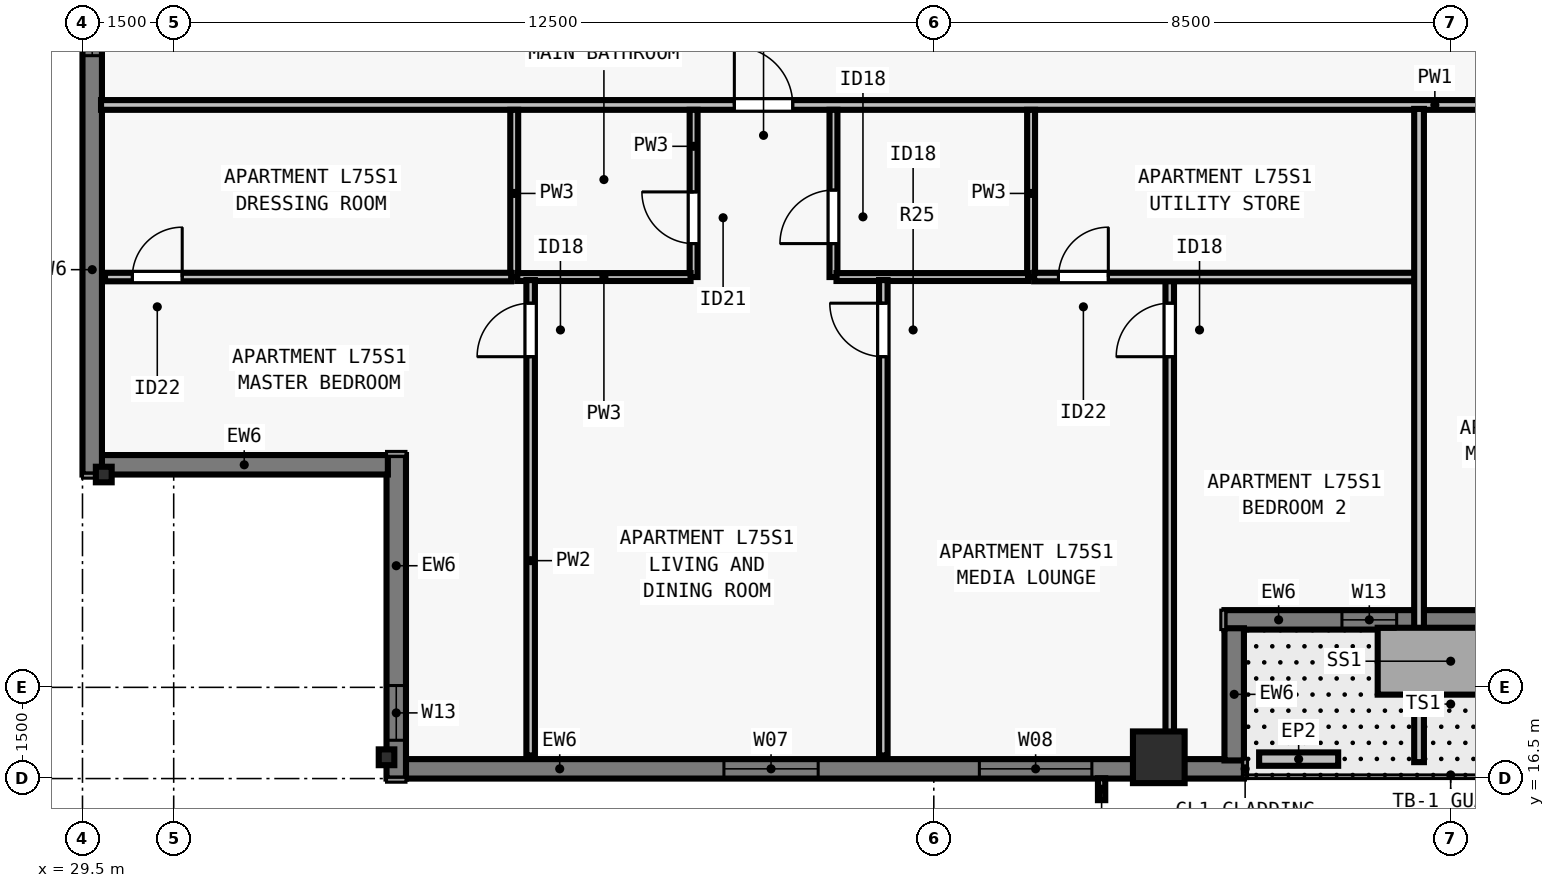
"""IFC4 building model, lengths in metres.
Left out: names, types, materials, properties, quantities, classifications, styles, units other than length and angle.
Written with IfcOpenShell. Run it as: python <this file> out.ifc"""

import sys

from ifc_helpers import new_model, si_unit, direction, frame, frame_2d, origin, origin_2d, place, context, subcontext, project, spatial, rectangle, i_section, extrude, element, fill, save


model = new_model("IFC4")
c1 = context("Model", 3, precision=1e-05, world=origin(), true_north=direction((0.0, 1.0)))
c2 = subcontext(c1, "Body", "Model", "MODEL_VIEW")
j1 = project(units=[si_unit("LENGTHUNIT", "METRE"), si_unit("PLANEANGLEUNIT", "RADIAN")], contexts=[c1])
p1 = place(None, origin())
s1 = spatial("IfcSite", under=j1, at=p1, CompositionType="ELEMENT")
p2 = place(p1, origin())
s2 = spatial("IfcBuilding", under=s1, at=p2, CompositionType="ELEMENT")
p3 = place(p2, frame((0.0, 0.0, 272.5)))
s3 = spatial("IfcBuildingStorey", under=s2, at=p3, CompositionType="ELEMENT", Elevation=272.5)
p4 = place(p3, frame((34.5, 16.85, 0.0), z_axis=(0.0, 0.0, 1.0), x_axis=(1.0, 0.0, 0.0)))
e1 = element("IfcColumn", 1, at=p4, inside=s3, PredefinedType="COLUMN", context=c2, shape_type="SweptSolid", body=[
    extrude(i_section(OverallWidth=0.256, OverallDepth=0.26, WebThickness=0.01, FlangeThickness=0.017, FilletRadius=0.013, at=origin_2d()), origin(), (0.0, 0.0, 1.0), 3.5),
])
p5 = place(p3, frame((47.2, 16.85, 0.0), z_axis=(0.0, 0.0, 1.0), x_axis=(1.0, 0.0, 0.0)))
e2 = element("IfcColumn", 2, at=p5, inside=s3, PredefinedType="COLUMN", context=c2, shape_type="SweptSolid", body=[
    extrude(rectangle(XDim=0.85, YDim=0.85, at=origin_2d()), origin(), (0.0, 0.0, 1.0), 3.5),
])
p6 = place(p3, frame((29.85, 21.5, 0.0), z_axis=(0.0, 0.0, 1.0), x_axis=(0.0, 1.0, 0.0)))
e3 = element("IfcColumn", 3, at=p6, inside=s3, PredefinedType="COLUMN", context=c2, shape_type="SweptSolid", body=[
    extrude(i_section(OverallWidth=0.256, OverallDepth=0.26, WebThickness=0.01, FlangeThickness=0.017, FilletRadius=0.013, at=origin_2d()), origin(), (0.0, 0.0, 1.0), 3.5),
])
p7 = place(p3, frame((48.6, 16.66, 0.0), z_axis=(0.0, 0.0, 1.0), x_axis=(-1.0, 0.0, 0.0)))
e4 = element("IfcWall", 4, at=p7, inside=s3, PredefinedType="SOLIDWALL", context=c2, shape_type="SweptSolid", body=[
    extrude(rectangle(XDim=13.802, YDim=0.32, at=frame_2d((6.901, 0.0))), origin(), (0.0, 0.0, 1.0), 3.24),
])
p8 = place(p7, frame((2.5, 0.0, 0.8)))
e5 = element("IfcOpeningElement", 5, at=p8, cuts=e4, PredefinedType="OPENING", context=c2, shape_type="SweptSolid", body=[
    extrude(rectangle(XDim=1.85, YDim=1.628, at=frame_2d((0.925, 0.814))), frame((0.0, 0.17, 0.0), z_axis=(0.0, -1.0, 0.0), x_axis=(1.0, 0.0, 0.0)), (0.0, 0.0, 1.0), 0.34),
])
p9 = place(p7, frame((7.001, 0.0, 0.8)))
e6 = element("IfcOpeningElement", 6, at=p9, cuts=e4, PredefinedType="OPENING", context=c2, shape_type="SweptSolid", body=[
    extrude(rectangle(XDim=1.55, YDim=1.628, at=frame_2d((0.775, 0.814))), frame((0.0, 0.17, 0.0), z_axis=(0.0, -1.0, 0.0), x_axis=(1.0, 0.0, 0.0)), (0.0, 0.0, 1.0), 0.34),
])
p10 = place(p3, frame((34.66, 16.5, 0.0), z_axis=(0.0, 0.0, 1.0), x_axis=(0.0, 1.0, 0.0)))
e7 = element("IfcWall", 7, at=p10, inside=s3, PredefinedType="SOLIDWALL", context=c2, shape_type="SweptSolid", body=[
    extrude(rectangle(XDim=5.32, YDim=0.32, at=frame_2d((2.66, 0.0))), origin(), (0.0, 0.0, 1.0), 3.24),
])
p11 = place(p10, frame((0.63, 0.0, 0.8)))
e8 = element("IfcOpeningElement", 8, at=p11, cuts=e7, PredefinedType="OPENING", context=c2, shape_type="SweptSolid", body=[
    extrude(rectangle(XDim=0.9, YDim=1.628, at=frame_2d((0.45, 0.814))), frame((0.0, 0.17, 0.0), z_axis=(0.0, -1.0, 0.0), x_axis=(1.0, 0.0, 0.0)), (0.0, 0.0, 1.0), 0.34),
])
p12 = place(p3, frame((34.522, 21.66, 0.0), z_axis=(0.0, 0.0, 1.0), x_axis=(-1.0, 0.0, 0.0)))
e9 = element("IfcWall", 9, at=p12, inside=s3, PredefinedType="SOLIDWALL", context=c2, shape_type="SweptSolid", body=[
    extrude(rectangle(XDim=4.724, YDim=0.32, at=frame_2d((2.362, 0.0))), origin(), (0.0, 0.0, 1.0), 3.24),
])
p13 = place(p3, frame((29.66, 21.5, 0.0), z_axis=(0.0, 0.0, 1.0), x_axis=(0.0, 1.0, 0.0)))
e10 = element("IfcWall", 10, at=p13, inside=s3, PredefinedType="SOLIDWALL", context=c2, shape_type="SweptSolid", body=[
    extrude(rectangle(XDim=34.702, YDim=0.32, at=frame_2d((17.351, 0.0))), origin(), (0.0, 0.0, 1.0), 3.24),
])
p14 = place(p13, frame((6.888, 0.0, 0.8)))
e11 = element("IfcOpeningElement", 11, at=p14, cuts=e10, PredefinedType="OPENING", context=c2, shape_type="SweptSolid", body=[
    extrude(rectangle(XDim=1.55, YDim=1.628, at=frame_2d((0.775, 0.814))), frame((0.0, 0.17, 0.0), z_axis=(0.0, -1.0, 0.0), x_axis=(1.0, 0.0, 0.0)), (0.0, 0.0, 1.0), 0.34),
])
p15 = place(p13, frame((10.113, 0.0, 0.8)))
e12 = element("IfcOpeningElement", 12, at=p15, cuts=e10, PredefinedType="OPENING", context=c2, shape_type="SweptSolid", body=[
    extrude(rectangle(XDim=1.85, YDim=1.628, at=frame_2d((0.925, 0.814))), frame((0.0, 0.17, 0.0), z_axis=(0.0, -1.0, 0.0), x_axis=(1.0, 0.0, 0.0)), (0.0, 0.0, 1.0), 0.34),
])
p16 = place(p13, frame((14.888, 0.0, 0.8)))
e13 = element("IfcOpeningElement", 13, at=p16, cuts=e10, PredefinedType="OPENING", context=c2, shape_type="SweptSolid", body=[
    extrude(rectangle(XDim=1.55, YDim=1.628, at=frame_2d((0.775, 0.814))), frame((0.0, 0.17, 0.0), z_axis=(0.0, -1.0, 0.0), x_axis=(1.0, 0.0, 0.0)), (0.0, 0.0, 1.0), 0.34),
])
p17 = place(p13, frame((18.114, 0.0, 0.8)))
e14 = element("IfcOpeningElement", 14, at=p17, cuts=e10, PredefinedType="OPENING", context=c2, shape_type="SweptSolid", body=[
    extrude(rectangle(XDim=1.85, YDim=1.628, at=frame_2d((0.925, 0.814))), frame((0.0, 0.17, 0.0), z_axis=(0.0, -1.0, 0.0), x_axis=(1.0, 0.0, 0.0)), (0.0, 0.0, 1.0), 0.34),
])
p18 = place(p13, frame((23.614, 0.0, 0.8)))
e15 = element("IfcOpeningElement", 15, at=p18, cuts=e10, PredefinedType="OPENING", context=c2, shape_type="SweptSolid", body=[
    extrude(rectangle(XDim=1.85, YDim=1.628, at=frame_2d((0.925, 0.814))), frame((0.0, 0.17, 0.0), z_axis=(0.0, -1.0, 0.0), x_axis=(1.0, 0.0, 0.0)), (0.0, 0.0, 1.0), 0.34),
])
p19 = place(p13, frame((29.24, 0.0, 0.8)))
e16 = element("IfcOpeningElement", 16, at=p19, cuts=e10, PredefinedType="OPENING", context=c2, shape_type="SweptSolid", body=[
    extrude(rectangle(XDim=1.55, YDim=1.628, at=frame_2d((0.775, 0.814))), frame((0.0, 0.17, 0.0), z_axis=(0.0, -1.0, 0.0), x_axis=(1.0, 0.0, 0.0)), (0.0, 0.0, 1.0), 0.34),
])
p20 = place(p3, frame((55.422, 19.11, 0.0), z_axis=(0.0, 0.0, 1.0), x_axis=(-1.0, 0.0, 0.0)))
e17 = element("IfcWall", 17, at=p20, inside=s3, PredefinedType="SOLIDWALL", context=c2, shape_type="SweptSolid", body=[
    extrude(rectangle(XDim=7.142, YDim=0.32, at=frame_2d((3.571, 0.0))), origin(), (0.0, 0.0, 1.0), 3.24),
])
p21 = place(p20, frame((1.796, 0.0, 0.0)))
e18 = element("IfcOpeningElement", 18, at=p21, cuts=e17, PredefinedType="OPENING", context=c2, shape_type="SweptSolid", body=[
    extrude(rectangle(XDim=1.0, YDim=2.15, at=frame_2d((0.5, 1.075))), frame((0.0, 0.17, 0.0), z_axis=(0.0, -1.0, 0.0), x_axis=(1.0, 0.0, 0.0)), (0.0, 0.0, 1.0), 0.34),
])
p22 = place(p20, frame((4.31, 0.0, 0.8)))
e19 = element("IfcOpeningElement", 19, at=p22, cuts=e17, PredefinedType="OPENING", context=c2, shape_type="SweptSolid", body=[
    extrude(rectangle(XDim=0.9, YDim=1.628, at=frame_2d((0.45, 0.814))), frame((0.0, 0.17, 0.0), z_axis=(0.0, -1.0, 0.0), x_axis=(1.0, 0.0, 0.0)), (0.0, 0.0, 1.0), 0.34),
])
p23 = place(p3, frame((48.44, 18.972, 0.0), z_axis=(0.0, 0.0, 1.0), x_axis=(0.0, -1.0, 0.0)))
e20 = element("IfcWall", 20, at=p23, inside=s3, PredefinedType="SOLIDWALL", context=c2, shape_type="SweptSolid", body=[
    extrude(rectangle(XDim=2.174, YDim=0.32, at=frame_2d((1.087, 0.0))), origin(), (0.0, 0.0, 1.0), 3.24),
])
p24 = place(p3, frame((48.85, 16.82, 0.0), z_axis=(0.0, 0.0, 1.0), x_axis=(1.0, 0.0, 0.0)))
e21 = element("IfcWall", 21, at=p24, inside=s3, PredefinedType="PARAPET", context=c2, shape_type="SweptSolid", body=[
    extrude(rectangle(XDim=1.3, YDim=0.22, at=frame_2d((0.65, 0.0))), origin(), (0.0, 0.0, 1.0), 0.55),
])
p25 = place(p3, frame((29.805, 27.577, 0.0), z_axis=(0.0, 0.0, 1.0), x_axis=(1.0, 0.0, 0.0)))
e22 = element("IfcWall", 22, at=p25, inside=s3, PredefinedType="PARTITIONING", context=c2, shape_type="SweptSolid", body=[
    extrude(rectangle(XDim=44.39, YDim=0.16, at=frame_2d((22.195, 0.0))), origin(), (0.0, 0.0, 1.0), 2.908),
])
p26 = place(p25, frame((10.415, 0.0, 0.0)))
e23 = element("IfcOpeningElement", 23, at=p26, cuts=e22, PredefinedType="OPENING", context=c2, shape_type="SweptSolid", body=[
    extrude(rectangle(XDim=0.96, YDim=2.18, at=frame_2d((0.48, 1.09))), frame((0.0, 0.09, 0.0), z_axis=(0.0, -1.0, 0.0), x_axis=(1.0, 0.0, 0.0)), (0.0, 0.0, 1.0), 0.18),
])
p27 = place(p25, frame((32.495, 0.0, 0.0)))
e24 = element("IfcOpeningElement", 24, at=p27, cuts=e22, PredefinedType="OPENING", context=c2, shape_type="SweptSolid", body=[
    extrude(rectangle(XDim=0.96, YDim=2.18, at=frame_2d((0.48, 1.09))), frame((0.0, 0.09, 0.0), z_axis=(0.0, -1.0, 0.0), x_axis=(1.0, 0.0, 0.0)), (0.0, 0.0, 1.0), 0.18),
])
p28 = place(p3, frame((36.6, 24.748, 0.0), z_axis=(0.0, 0.0, 1.0), x_axis=(0.0, 1.0, 0.0)))
e25 = element("IfcWall", 25, at=p28, inside=s3, PredefinedType="PLUMBINGWALL", context=c2, shape_type="SweptSolid", body=[
    extrude(rectangle(XDim=2.75, YDim=0.13, at=frame_2d((1.375, 0.0))), origin(), (0.0, 0.0, 1.0), 3.24),
])
p29 = place(p3, frame((39.55, 24.748, 0.0), z_axis=(0.0, 0.0, 1.0), x_axis=(0.0, 1.0, 0.0)))
e26 = element("IfcWall", 26, at=p29, inside=s3, PredefinedType="PLUMBINGWALL", context=c2, shape_type="SweptSolid", body=[
    extrude(rectangle(XDim=2.75, YDim=0.13, at=frame_2d((1.375, 0.0))), origin(), (0.0, 0.0, 1.0), 3.24),
])
p30 = place(p29, frame((0.55, 0.0, 0.0)))
e27 = element("IfcOpeningElement", 27, at=p30, cuts=e26, PredefinedType="OPENING", context=c2, shape_type="SweptSolid", body=[
    extrude(rectangle(XDim=0.85, YDim=2.08, at=frame_2d((0.425, 1.04))), frame((0.0, 0.075, 0.0), z_axis=(0.0, -1.0, 0.0), x_axis=(1.0, 0.0, 0.0)), (0.0, 0.0, 1.0), 0.15),
])
p31 = place(p3, frame((36.65, 24.748, 0.0), z_axis=(0.0, 0.0, 1.0), x_axis=(1.0, 0.0, 0.0)))
e28 = element("IfcWall", 28, at=p31, inside=s3, PredefinedType="PLUMBINGWALL", context=c2, shape_type="SweptSolid", body=[
    extrude(rectangle(XDim=2.85, YDim=0.13, at=frame_2d((1.425, 0.0))), origin(), (0.0, 0.0, 1.0), 3.24),
])
p32 = place(p3, frame((45.1, 24.748, 0.0), z_axis=(0.0, 0.0, 1.0), x_axis=(0.0, 1.0, 0.0)))
e29 = element("IfcWall", 29, at=p32, inside=s3, PredefinedType="PLUMBINGWALL", context=c2, shape_type="SweptSolid", body=[
    extrude(rectangle(XDim=2.75, YDim=0.13, at=frame_2d((1.375, 0.0))), origin(), (0.0, 0.0, 1.0), 3.24),
])
p33 = place(p3, frame((41.85, 24.748, 0.0), z_axis=(0.0, 0.0, 1.0), x_axis=(0.0, 1.0, 0.0)))
e30 = element("IfcWall", 30, at=p33, inside=s3, PredefinedType="PLUMBINGWALL", context=c2, shape_type="SweptSolid", body=[
    extrude(rectangle(XDim=2.75, YDim=0.13, at=frame_2d((1.375, 0.0))), origin(), (0.0, 0.0, 1.0), 3.24),
])
p34 = place(p33, frame((0.55, 0.0, 0.0)))
e31 = element("IfcOpeningElement", 31, at=p34, cuts=e30, PredefinedType="OPENING", context=c2, shape_type="SweptSolid", body=[
    extrude(rectangle(XDim=0.88, YDim=2.1, at=frame_2d((0.44, 1.05))), frame((0.0, 0.075, 0.0), z_axis=(0.0, -1.0, 0.0), x_axis=(1.0, 0.0, 0.0)), (0.0, 0.0, 1.0), 0.15),
])
p35 = place(p3, frame((41.9, 24.748, 0.0), z_axis=(0.0, 0.0, 1.0), x_axis=(1.0, 0.0, 0.0)))
e32 = element("IfcWall", 32, at=p35, inside=s3, PredefinedType="PLUMBINGWALL", context=c2, shape_type="SweptSolid", body=[
    extrude(rectangle(XDim=3.15, YDim=0.13, at=frame_2d((1.575, 0.0))), origin(), (0.0, 0.0, 1.0), 3.24),
])
p36 = place(p3, frame((36.87, 16.88, 0.0), z_axis=(0.0, 0.0, 1.0), x_axis=(0.0, 1.0, 0.0)))
e33 = element("IfcWall", 33, at=p36, inside=s3, PredefinedType="PARTITIONING", context=c2, shape_type="SweptSolid", body=[
    extrude(rectangle(XDim=7.818, YDim=0.14, at=frame_2d((3.909, 0.0))), origin(), (0.0, 0.0, 1.0), 2.523),
])
p37 = place(p36, frame((6.558, 0.0, 0.0)))
e34 = element("IfcOpeningElement", 34, at=p37, cuts=e33, PredefinedType="OPENING", context=c2, shape_type="SweptSolid", body=[
    extrude(rectangle(XDim=0.88, YDim=2.1, at=frame_2d((0.44, 1.05))), frame((0.0, 0.08, 0.0), z_axis=(0.0, -1.0, 0.0), x_axis=(1.0, 0.0, 0.0)), (0.0, 0.0, 1.0), 0.16),
])
p38 = place(p3, frame((29.87, 24.748, 0.0), z_axis=(0.0, 0.0, 1.0), x_axis=(1.0, 0.0, 0.0)))
e35 = element("IfcWall", 35, at=p38, inside=s3, PredefinedType="PARTITIONING", context=c2, shape_type="SweptSolid", body=[
    extrude(rectangle(XDim=6.68, YDim=0.14, at=frame_2d((3.34, 0.0))), origin(), (0.0, 0.0, 1.0), 2.908),
])
p39 = place(p38, frame((0.45, 0.0, 0.0)))
e36 = element("IfcOpeningElement", 36, at=p39, cuts=e35, PredefinedType="OPENING", context=c2, shape_type="SweptSolid", body=[
    extrude(rectangle(XDim=0.82, YDim=2.1, at=frame_2d((0.41, 1.05))), frame((0.0, 0.08, 0.0), z_axis=(0.0, -1.0, 0.0), x_axis=(1.0, 0.0, 0.0)), (0.0, 0.0, 1.0), 0.16),
])
p40 = place(p3, frame((47.38, 16.88, 0.0), z_axis=(0.0, 0.0, 1.0), x_axis=(0.0, 1.0, 0.0)))
e37 = element("IfcWall", 37, at=p40, inside=s3, PredefinedType="PARTITIONING", context=c2, shape_type="SweptSolid", body=[
    extrude(rectangle(XDim=7.908, YDim=0.14, at=frame_2d((3.954, 0.0))), origin(), (0.0, 0.0, 1.0), 2.523),
])
p41 = place(p40, frame((6.558, 0.0, 0.0)))
e38 = element("IfcOpeningElement", 38, at=p41, cuts=e37, PredefinedType="OPENING", context=c2, shape_type="SweptSolid", body=[
    extrude(rectangle(XDim=0.88, YDim=2.1, at=frame_2d((0.44, 1.05))), frame((0.0, 0.08, 0.0), z_axis=(0.0, -1.0, 0.0), x_axis=(1.0, 0.0, 0.0)), (0.0, 0.0, 1.0), 0.16),
])
p42 = place(p3, frame((45.15, 24.748, 0.0), z_axis=(0.0, 0.0, 1.0), x_axis=(1.0, 0.0, 0.0)))
e39 = element("IfcWall", 39, at=p42, inside=s3, PredefinedType="PARTITIONING", context=c2, shape_type="SweptSolid", body=[
    extrude(rectangle(XDim=6.38, YDim=0.14, at=frame_2d((3.19, 0.0))), origin(), (0.0, 0.0, 1.0), 3.24),
])
p43 = place(p42, frame((0.4, 0.0, 0.0)))
e40 = element("IfcOpeningElement", 40, at=p43, cuts=e39, PredefinedType="OPENING", context=c2, shape_type="SweptSolid", body=[
    extrude(rectangle(XDim=0.82, YDim=2.1, at=frame_2d((0.41, 1.05))), frame((0.0, 0.08, 0.0), z_axis=(0.0, -1.0, 0.0), x_axis=(1.0, 0.0, 0.0)), (0.0, 0.0, 1.0), 0.16),
])
p44 = place(p3, frame((42.67, 16.88, 0.0), z_axis=(0.0, 0.0, 1.0), x_axis=(0.0, 1.0, 0.0)))
e41 = element("IfcWall", 41, at=p44, inside=s3, PredefinedType="PARTITIONING", context=c2, shape_type="SweptSolid", body=[
    extrude(rectangle(XDim=7.818, YDim=0.14, at=frame_2d((3.909, 0.0))), origin(), (0.0, 0.0, 1.0), 3.24),
])
p45 = place(p44, frame((6.558, 0.0, 0.0)))
e42 = element("IfcOpeningElement", 42, at=p45, cuts=e41, PredefinedType="OPENING", context=c2, shape_type="SweptSolid", body=[
    extrude(rectangle(XDim=0.88, YDim=2.1, at=frame_2d((0.44, 1.05))), frame((0.0, 0.08, 0.0), z_axis=(0.0, -1.0, 0.0), x_axis=(1.0, 0.0, 0.0)), (0.0, 0.0, 1.0), 0.16),
])
p46 = place(p3, frame((51.48, 16.77, 0.0), z_axis=(0.0, 0.0, 1.0), x_axis=(0.0, 1.0, 0.0)))
e43 = element("IfcWall", 43, at=p46, inside=s3, PredefinedType="PARTITIONING", context=c2, shape_type="SweptSolid", body=[
    extrude(rectangle(XDim=10.742, YDim=0.16, at=frame_2d((5.371, 0.0))), origin(), (0.0, 0.0, 1.0), 2.908),
])
p47 = place(p8, origin())
e44 = element("IfcWindow", 44, at=p47, inside=s3, PartitioningType="SINGLE_PANEL", PredefinedType="WINDOW", context=c2, shape_type="SweptSolid", body=[
    extrude(rectangle(XDim=1.85, YDim=1.628, at=frame_2d((0.925, 0.814))), frame((0.0, -0.05, 0.0), z_axis=(0.0, -1.0, 0.0), x_axis=(1.0, 0.0, 0.0)), (0.0, 0.0, 1.0), 0.06),
])
fill(e5, e44)
p48 = place(p9, origin())
e45 = element("IfcWindow", 45, at=p48, inside=s3, PartitioningType="SINGLE_PANEL", PredefinedType="WINDOW", context=c2, shape_type="SweptSolid", body=[
    extrude(rectangle(XDim=1.55, YDim=1.628, at=frame_2d((0.775, 0.814))), frame((0.0, -0.05, 0.0), z_axis=(0.0, -1.0, 0.0), x_axis=(1.0, 0.0, 0.0)), (0.0, 0.0, 1.0), 0.06),
])
fill(e6, e45)
p49 = place(p14, origin())
e46 = element("IfcWindow", 46, at=p49, inside=s3, PartitioningType="SINGLE_PANEL", PredefinedType="WINDOW", context=c2, shape_type="SweptSolid", body=[
    extrude(rectangle(XDim=1.55, YDim=1.628, at=frame_2d((0.775, 0.814))), frame((0.0, -0.05, 0.0), z_axis=(0.0, -1.0, 0.0), x_axis=(1.0, 0.0, 0.0)), (0.0, 0.0, 1.0), 0.06),
])
fill(e11, e46)
p50 = place(p11, origin())
e47 = element("IfcWindow", 47, at=p50, inside=s3, PartitioningType="SINGLE_PANEL", PredefinedType="WINDOW", context=c2, shape_type="SweptSolid", body=[
    extrude(rectangle(XDim=0.9, YDim=1.628, at=frame_2d((0.45, 0.814))), frame((0.0, -0.04, 0.0), z_axis=(0.0, -1.0, 0.0), x_axis=(1.0, 0.0, 0.0)), (0.0, 0.0, 1.0), 0.06),
])
fill(e8, e47)
p51 = place(p22, origin())
e48 = element("IfcWindow", 48, at=p51, inside=s3, PartitioningType="SINGLE_PANEL", PredefinedType="WINDOW", context=c2, shape_type="SweptSolid", body=[
    extrude(rectangle(XDim=0.9, YDim=1.628, at=frame_2d((0.45, 0.814))), frame((0.0, -0.04, 0.0), z_axis=(0.0, -1.0, 0.0), x_axis=(1.0, 0.0, 0.0)), (0.0, 0.0, 1.0), 0.06),
])
fill(e19, e48)
p52 = place(p30, origin())
e49 = element("IfcDoor", 49, at=p52, inside=s3, OperationType="SINGLE_SWING_RIGHT", PredefinedType="DOOR", context=c2, shape_type="SweptSolid", body=[
    extrude(rectangle(XDim=0.85, YDim=2.08, at=frame_2d((0.425, 1.04))), frame((0.0, 0.025, 0.0), z_axis=(0.0, -1.0, 0.0), x_axis=(1.0, 0.0, 0.0)), (0.0, 0.0, 1.0), 0.05),
])
fill(e27, e49)
p53 = place(p34, origin())
e50 = element("IfcDoor", 50, at=p53, inside=s3, OperationType="SINGLE_SWING_LEFT", PredefinedType="DOOR", context=c2, shape_type="SweptSolid", body=[
    extrude(rectangle(XDim=0.88, YDim=2.1, at=frame_2d((0.44, 1.05))), frame((0.0, 0.025, 0.0), z_axis=(0.0, -1.0, 0.0), x_axis=(1.0, 0.0, 0.0)), (0.0, 0.0, 1.0), 0.05),
])
fill(e31, e50)
p54 = place(p39, origin())
e51 = element("IfcDoor", 51, at=p54, inside=s3, OperationType="SINGLE_SWING_RIGHT", PredefinedType="DOOR", context=c2, shape_type="SweptSolid", body=[
    extrude(rectangle(XDim=0.82, YDim=2.1, at=frame_2d((0.41, 1.05))), frame((0.0, 0.025, 0.0), z_axis=(0.0, -1.0, 0.0), x_axis=(1.0, 0.0, 0.0)), (0.0, 0.0, 1.0), 0.05),
])
fill(e36, e51)
p55 = place(p37, origin())
e52 = element("IfcDoor", 52, at=p55, inside=s3, OperationType="SINGLE_SWING_LEFT", PredefinedType="DOOR", context=c2, shape_type="SweptSolid", body=[
    extrude(rectangle(XDim=0.88, YDim=2.1, at=frame_2d((0.44, 1.05))), frame((0.0, 0.025, 0.0), z_axis=(0.0, -1.0, 0.0), x_axis=(1.0, 0.0, 0.0)), (0.0, 0.0, 1.0), 0.05),
])
fill(e34, e52)
p56 = place(p43, origin())
e53 = element("IfcDoor", 53, at=p56, inside=s3, OperationType="SINGLE_SWING_RIGHT", PredefinedType="DOOR", context=c2, shape_type="SweptSolid", body=[
    extrude(rectangle(XDim=0.82, YDim=2.1, at=frame_2d((0.41, 1.05))), frame((0.0, 0.025, 0.0), z_axis=(0.0, -1.0, 0.0), x_axis=(1.0, 0.0, 0.0)), (0.0, 0.0, 1.0), 0.05),
])
fill(e40, e53)
p57 = place(p41, origin())
e54 = element("IfcDoor", 54, at=p57, inside=s3, OperationType="SINGLE_SWING_LEFT", PredefinedType="DOOR", context=c2, shape_type="SweptSolid", body=[
    extrude(rectangle(XDim=0.88, YDim=2.1, at=frame_2d((0.44, 1.05))), frame((0.0, 0.025, 0.0), z_axis=(0.0, -1.0, 0.0), x_axis=(1.0, 0.0, 0.0)), (0.0, 0.0, 1.0), 0.05),
])
fill(e38, e54)
p58 = place(p45, origin())
e55 = element("IfcDoor", 55, at=p58, inside=s3, OperationType="SINGLE_SWING_RIGHT", PredefinedType="DOOR", context=c2, shape_type="SweptSolid", body=[
    extrude(rectangle(XDim=0.88, YDim=2.1, at=frame_2d((0.44, 1.05))), frame((0.0, 0.025, 0.0), z_axis=(0.0, -1.0, 0.0), x_axis=(1.0, 0.0, 0.0)), (0.0, 0.0, 1.0), 0.05),
])
fill(e42, e55)
p59 = place(p26, origin())
e56 = element("IfcDoor", 56, at=p59, inside=s3, OperationType="SINGLE_SWING_LEFT", PredefinedType="DOOR", context=c2, shape_type="SweptSolid", body=[
    extrude(rectangle(XDim=0.96, YDim=2.18, at=frame_2d((0.48, 1.09))), frame((0.0, 0.025, 0.0), z_axis=(0.0, -1.0, 0.0), x_axis=(1.0, 0.0, 0.0)), (0.0, 0.0, 1.0), 0.05),
])
fill(e23, e56)
save(model, sys.argv[1])
